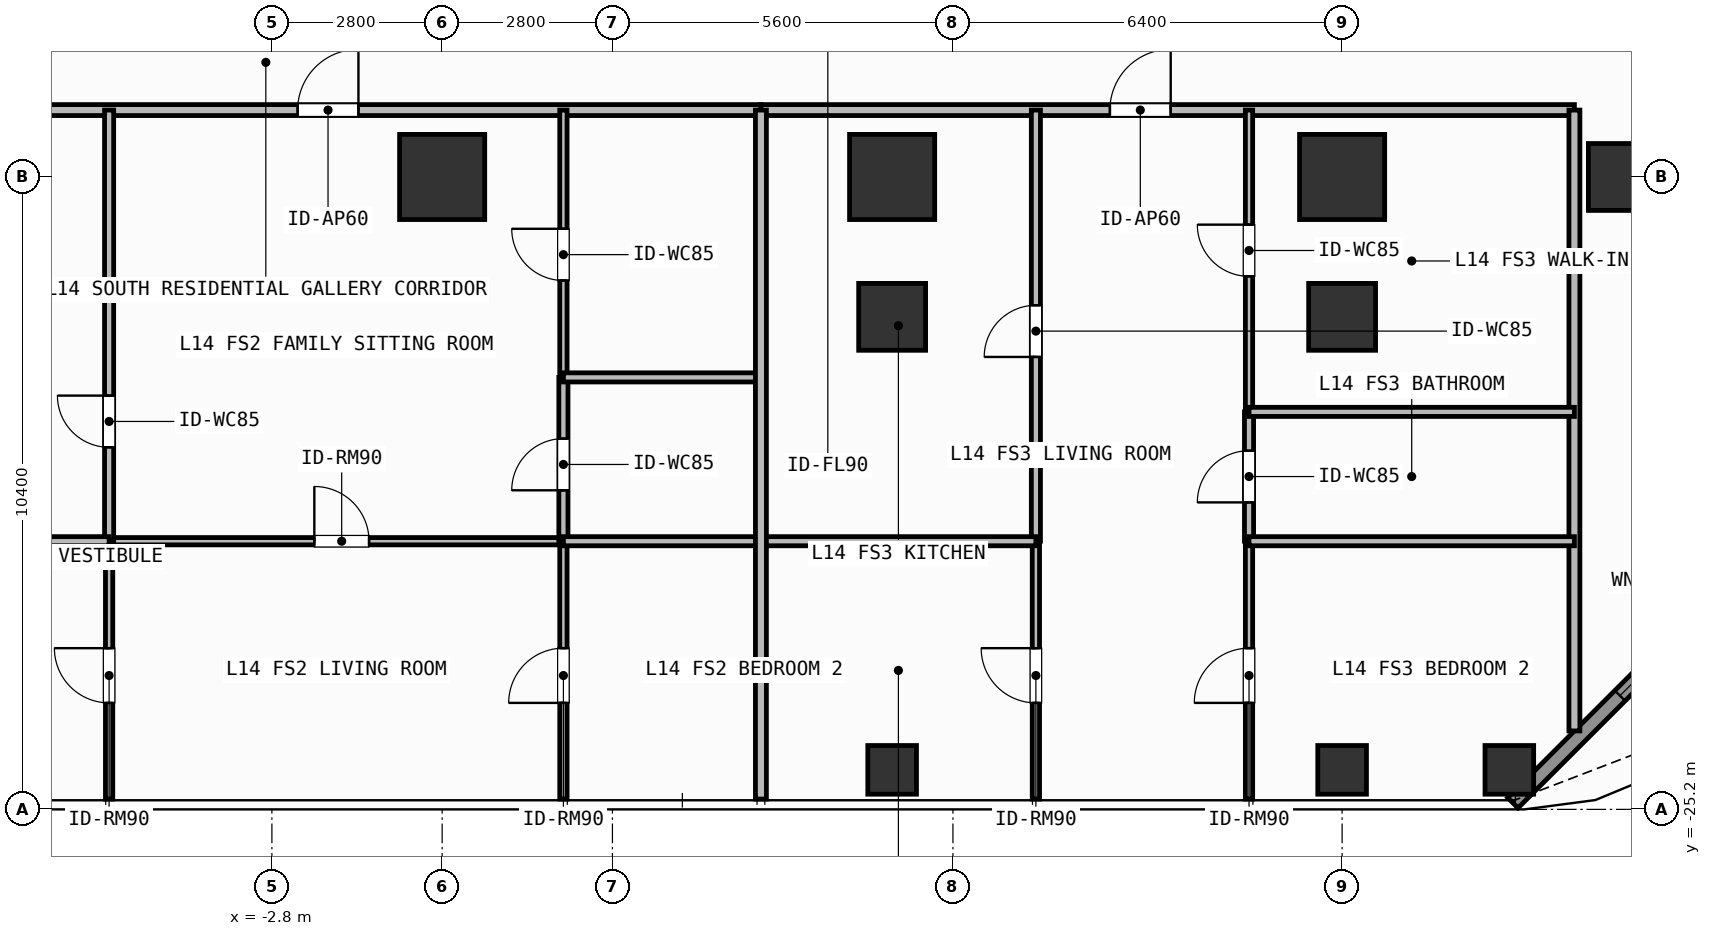
"""IFC4 building model, lengths in metres.
Left out: names, types, materials, properties, quantities, classifications, styles, units other than length and angle.
Written with IfcOpenShell. Run it as: python <this file> out.ifc"""

import sys

from ifc_helpers import new_model, si_unit, direction, frame, frame_2d, origin, origin_2d, place, context, subcontext, project, spatial, rectangle, hollow_rectangle, extrude, element, fill, save


model = new_model("IFC4")
c1 = context("Model", 3, precision=1e-05, world=origin(), true_north=direction((0.0, 1.0)))
c2 = subcontext(c1, "Body", "Model", "MODEL_VIEW")
j1 = project(units=[si_unit("LENGTHUNIT", "METRE"), si_unit("PLANEANGLEUNIT", "RADIAN")], contexts=[c1])
p1 = place(None, origin())
s1 = spatial("IfcSite", under=j1, at=p1, CompositionType="ELEMENT")
p2 = place(p1, origin())
s2 = spatial("IfcBuilding", under=s1, at=p2, CompositionType="ELEMENT")
p3 = place(p2, frame((0.0, 0.0, 54.0)))
s3 = spatial("IfcBuildingStorey", under=s2, at=p3, CompositionType="ELEMENT", Elevation=54.0)
for number, where, z_axis, x_axis in (
    (1, (0.0, -14.8, 0.0), (0.0, 0.0, 1.0), (1.0, 0.0, 0.0)),
    (2, (7.4, -14.8, 0.0), (0.0, 0.0, 1.0), (1.0, 0.0, 0.0)),
    (3, (14.8, -14.8, 0.0), (0.0, 0.0, 1.0), (1.0, 0.0, 0.0)),
):
    element("IfcColumn", number, at=place(p3, frame(where, z_axis=z_axis, x_axis=x_axis)), inside=s3, PredefinedType="COLUMN", context=c2, shape_type="SweptSolid", body=[
        extrude(rectangle(XDim=1.4, YDim=1.4, at=origin_2d()), origin(), (0.0, 0.0, 1.0), 3.9),
    ])
for number, where, z_axis, x_axis in (
    (4, (19.4, -14.8, 0.0), (0.0, 0.0, 1.0), (1.0, 0.0, 0.0)),
    (5, (7.4, -17.1, 0.0), (0.0, 0.0, 1.0), (1.0, 0.0, 0.0)),
    (6, (14.8, -17.1, 0.0), (0.0, 0.0, 1.0), (1.0, 0.0, 0.0)),
):
    element("IfcColumn", number, at=place(p3, frame(where, z_axis=z_axis, x_axis=x_axis)), inside=s3, PredefinedType="COLUMN", context=c2, shape_type="SweptSolid", body=[
        extrude(rectangle(XDim=1.1, YDim=1.1, at=origin_2d()), origin(), (0.0, 0.0, 1.0), 3.9),
    ])
for number, where, z_axis, x_axis in (
    (7, (17.55, -24.55, 0.0), (0.0, 0.0, 1.0), (1.0, 0.0, 0.0)),
    (8, (7.4, -24.55, 0.0), (0.0, 0.0, 1.0), (1.0, 0.0, 0.0)),
    (9, (14.8, -24.55, 0.0), (0.0, 0.0, 1.0), (1.0, 0.0, 0.0)),
):
    element("IfcColumn", number, at=place(p3, frame(where, z_axis=z_axis, x_axis=x_axis)), inside=s3, PredefinedType="COLUMN", context=c2, shape_type="SweptSolid", body=[
        extrude(hollow_rectangle(XDim=0.8, YDim=0.8, WallThickness=0.036, at=origin_2d()), origin(), (0.0, 0.0, 1.0), 3.9),
    ])
p4 = place(p3, frame((22.192, -20.508, 0.0), z_axis=(0.0, 0.0, 1.0), x_axis=(-0.707106781187, -0.707106781187, 0.0)))
e10 = element("IfcWall", 10, at=p4, inside=s3, PredefinedType="SOLIDWALL", context=c2, shape_type="SweptSolid", body=[
    extrude(rectangle(XDim=6.484, YDim=0.24, at=frame_2d((3.242, 0.0))), origin(), (0.0, 0.0, 1.0), 3.68),
])
p5 = place(p4, frame((2.492, 0.0, 0.8)))
e11 = element("IfcOpeningElement", 11, at=p5, cuts=e10, PredefinedType="OPENING", context=c2, shape_type="SweptSolid", body=[
    extrude(rectangle(XDim=1.5, YDim=1.85, at=frame_2d((0.75, 0.925))), frame((0.0, 0.13, 0.0), z_axis=(0.0, -1.0, 0.0), x_axis=(1.0, 0.0, 0.0)), (0.0, 0.0, 1.0), 0.26),
])
p6 = place(p3, frame((-12.225, -13.7, 0.0), z_axis=(0.0, 0.0, 1.0), x_axis=(1.0, 0.0, 0.0)))
e12 = element("IfcWall", 12, at=p6, inside=s3, PredefinedType="PARTITIONING", context=c2, shape_type="SweptSolid", body=[
    extrude(rectangle(XDim=17.467, YDim=0.18, at=frame_2d((8.733, 0.0))), origin(), (0.0, 0.0, 1.0), 3.68),
])
p7 = place(p6, frame((9.848, 0.0, 0.0)))
e13 = element("IfcOpeningElement", 13, at=p7, cuts=e12, PredefinedType="OPENING", context=c2, shape_type="SweptSolid", body=[
    extrude(rectangle(XDim=1.0, YDim=2.2, at=frame_2d((0.5, 1.1))), frame((0.0, 0.1, 0.0), z_axis=(0.0, -1.0, 0.0), x_axis=(1.0, 0.0, 0.0)), (0.0, 0.0, 1.0), 0.2),
])
p8 = place(p3, frame((-5.477, -20.79, 0.0), z_axis=(0.0, 0.0, 1.0), x_axis=(1.0, 0.0, 0.0)))
e14 = element("IfcWall", 14, at=p8, inside=s3, PredefinedType="PARTITIONING", context=c2, shape_type="SweptSolid", body=[
    extrude(rectangle(XDim=7.471, YDim=0.12, at=frame_2d((3.735, 0.0))), origin(), (0.0, 0.0, 1.0), 3.68),
])
p9 = place(p8, frame((3.375, 0.0, 0.0)))
e15 = element("IfcOpeningElement", 15, at=p9, cuts=e14, PredefinedType="OPENING", context=c2, shape_type="SweptSolid", body=[
    extrude(rectangle(XDim=0.9, YDim=2.1, at=frame_2d((0.45, 1.05))), frame((0.0, 0.07, 0.0), z_axis=(0.0, -1.0, 0.0), x_axis=(1.0, 0.0, 0.0)), (0.0, 0.0, 1.0), 0.14),
])
p10 = place(p3, frame((-5.477, -20.79, 0.0), z_axis=(0.0, 0.0, 1.0), x_axis=(0.0, 1.0, 0.0)))
e16 = element("IfcWall", 16, at=p10, inside=s3, PredefinedType="PARTITIONING", context=c2, shape_type="SweptSolid", body=[
    extrude(rectangle(XDim=4.112, YDim=0.15, at=frame_2d((2.056, 0.0))), origin(), (0.0, 0.0, 1.0), 3.68),
])
p11 = place(p10, frame((1.544, 0.0, 0.0)))
e17 = element("IfcOpeningElement", 17, at=p11, cuts=e16, PredefinedType="OPENING", context=c2, shape_type="SweptSolid", body=[
    extrude(rectangle(XDim=0.85, YDim=2.1, at=frame_2d((0.425, 1.05))), frame((0.0, 0.085, 0.0), z_axis=(0.0, -1.0, 0.0), x_axis=(1.0, 0.0, 0.0)), (0.0, 0.0, 1.0), 0.17),
])
p12 = place(p3, frame((-5.477, -16.678, 0.0), z_axis=(0.0, 0.0, 1.0), x_axis=(0.0, 1.0, 0.0)))
e18 = element("IfcWall", 18, at=p12, inside=s3, PredefinedType="PARTITIONING", context=c2, shape_type="SweptSolid", body=[
    extrude(rectangle(XDim=2.978, YDim=0.15, at=frame_2d((1.489, 0.0))), origin(), (0.0, 0.0, 1.0), 3.68),
])
p13 = place(p3, frame((-5.477, -25.03, 0.0), z_axis=(0.0, 0.0, 1.0), x_axis=(0.0, 1.0, 0.0)))
e19 = element("IfcWall", 19, at=p13, inside=s3, PredefinedType="PARTITIONING", context=c2, shape_type="SweptSolid", body=[
    extrude(rectangle(XDim=4.24, YDim=0.12, at=frame_2d((2.12, 0.0))), origin(), (0.0, 0.0, 1.0), 3.68),
])
p14 = place(p13, frame((1.581, 0.0, 0.0)))
e20 = element("IfcOpeningElement", 20, at=p14, cuts=e19, PredefinedType="OPENING", context=c2, shape_type="SweptSolid", body=[
    extrude(rectangle(XDim=0.9, YDim=2.1, at=frame_2d((0.45, 1.05))), frame((0.0, 0.07, 0.0), z_axis=(0.0, -1.0, 0.0), x_axis=(1.0, 0.0, 0.0)), (0.0, 0.0, 1.0), 0.14),
])
p15 = place(p3, frame((1.994, -20.79, 0.0), z_axis=(0.0, 0.0, 1.0), x_axis=(0.0, 1.0, 0.0)))
e21 = element("IfcWall", 21, at=p15, inside=s3, PredefinedType="PARTITIONING", context=c2, shape_type="SweptSolid", body=[
    extrude(rectangle(XDim=2.694, YDim=0.15, at=frame_2d((1.347, 0.0))), origin(), (0.0, 0.0, 1.0), 3.68),
])
p16 = place(p15, frame((0.837, 0.0, 0.0)))
e22 = element("IfcOpeningElement", 22, at=p16, cuts=e21, PredefinedType="OPENING", context=c2, shape_type="SweptSolid", body=[
    extrude(rectangle(XDim=0.85, YDim=2.1, at=frame_2d((0.425, 1.05))), frame((0.0, 0.085, 0.0), z_axis=(0.0, -1.0, 0.0), x_axis=(1.0, 0.0, 0.0)), (0.0, 0.0, 1.0), 0.17),
])
p17 = place(p3, frame((1.994, -18.096, 0.0), z_axis=(0.0, 0.0, 1.0), x_axis=(0.0, 1.0, 0.0)))
e23 = element("IfcWall", 23, at=p17, inside=s3, PredefinedType="PARTITIONING", context=c2, shape_type="SweptSolid", body=[
    extrude(rectangle(XDim=4.396, YDim=0.12, at=frame_2d((2.198, 0.0))), origin(), (0.0, 0.0, 1.0), 3.68),
])
p18 = place(p17, frame((1.594, 0.0, 0.0)))
e24 = element("IfcOpeningElement", 24, at=p18, cuts=e23, PredefinedType="OPENING", context=c2, shape_type="SweptSolid", body=[
    extrude(rectangle(XDim=0.85, YDim=2.1, at=frame_2d((0.425, 1.05))), frame((0.0, 0.07, 0.0), z_axis=(0.0, -1.0, 0.0), x_axis=(1.0, 0.0, 0.0)), (0.0, 0.0, 1.0), 0.14),
])
p19 = place(p3, frame((1.994, -25.03, 0.0), z_axis=(0.0, 0.0, 1.0), x_axis=(0.0, 1.0, 0.0)))
e25 = element("IfcWall", 25, at=p19, inside=s3, PredefinedType="PARTITIONING", context=c2, shape_type="SweptSolid", body=[
    extrude(rectangle(XDim=4.24, YDim=0.12, at=frame_2d((2.12, 0.0))), origin(), (0.0, 0.0, 1.0), 3.68),
])
p20 = place(p19, frame((1.581, 0.0, 0.0)))
e26 = element("IfcOpeningElement", 26, at=p20, cuts=e25, PredefinedType="OPENING", context=c2, shape_type="SweptSolid", body=[
    extrude(rectangle(XDim=0.9, YDim=2.1, at=frame_2d((0.45, 1.05))), frame((0.0, 0.07, 0.0), z_axis=(0.0, -1.0, 0.0), x_axis=(1.0, 0.0, 0.0)), (0.0, 0.0, 1.0), 0.14),
])
p21 = place(p3, frame((5.242, -13.7, 0.0), z_axis=(0.0, 0.0, 1.0), x_axis=(1.0, 0.0, 0.0)))
e27 = element("IfcWall", 27, at=p21, inside=s3, PredefinedType="PARTITIONING", context=c2, shape_type="SweptSolid", body=[
    extrude(rectangle(XDim=13.378, YDim=0.18, at=frame_2d((6.689, 0.0))), origin(), (0.0, 0.0, 1.0), 3.68),
])
p22 = place(p21, frame((5.739, 0.0, 0.0)))
e28 = element("IfcOpeningElement", 28, at=p22, cuts=e27, PredefinedType="OPENING", context=c2, shape_type="SweptSolid", body=[
    extrude(rectangle(XDim=1.0, YDim=2.2, at=frame_2d((0.5, 1.1))), frame((0.0, 0.1, 0.0), z_axis=(0.0, -1.0, 0.0), x_axis=(1.0, 0.0, 0.0)), (0.0, 0.0, 1.0), 0.2),
])
p23 = place(p3, frame((9.764, -20.79, 0.0), z_axis=(0.0, 0.0, 1.0), x_axis=(0.0, 1.0, 0.0)))
e29 = element("IfcWall", 29, at=p23, inside=s3, PredefinedType="PARTITIONING", context=c2, shape_type="SweptSolid", body=[
    extrude(rectangle(XDim=7.09, YDim=0.15, at=frame_2d((3.545, 0.0))), origin(), (0.0, 0.0, 1.0), 3.68),
])
p24 = place(p23, frame((3.03, 0.0, 0.0)))
e30 = element("IfcOpeningElement", 30, at=p24, cuts=e29, PredefinedType="OPENING", context=c2, shape_type="SweptSolid", body=[
    extrude(rectangle(XDim=0.85, YDim=2.1, at=frame_2d((0.425, 1.05))), frame((0.0, 0.085, 0.0), z_axis=(0.0, -1.0, 0.0), x_axis=(1.0, 0.0, 0.0)), (0.0, 0.0, 1.0), 0.17),
])
p25 = place(p3, frame((9.764, -25.03, 0.0), z_axis=(0.0, 0.0, 1.0), x_axis=(0.0, 1.0, 0.0)))
e31 = element("IfcWall", 31, at=p25, inside=s3, PredefinedType="PARTITIONING", context=c2, shape_type="SweptSolid", body=[
    extrude(rectangle(XDim=4.24, YDim=0.12, at=frame_2d((2.12, 0.0))), origin(), (0.0, 0.0, 1.0), 3.68),
])
p26 = place(p25, frame((1.581, 0.0, 0.0)))
e32 = element("IfcOpeningElement", 32, at=p26, cuts=e31, PredefinedType="OPENING", context=c2, shape_type="SweptSolid", body=[
    extrude(rectangle(XDim=0.9, YDim=2.1, at=frame_2d((0.45, 1.05))), frame((0.0, 0.07, 0.0), z_axis=(0.0, -1.0, 0.0), x_axis=(1.0, 0.0, 0.0)), (0.0, 0.0, 1.0), 0.14),
])
p27 = place(p3, frame((13.269, -20.79, 0.0), z_axis=(0.0, 0.0, 1.0), x_axis=(0.0, 1.0, 0.0)))
e33 = element("IfcWall", 33, at=p27, inside=s3, PredefinedType="PARTITIONING", context=c2, shape_type="SweptSolid", body=[
    extrude(rectangle(XDim=2.127, YDim=0.15, at=frame_2d((1.063, 0.0))), origin(), (0.0, 0.0, 1.0), 3.68),
])
p28 = place(p27, frame((0.638, 0.0, 0.0)))
e34 = element("IfcOpeningElement", 34, at=p28, cuts=e33, PredefinedType="OPENING", context=c2, shape_type="SweptSolid", body=[
    extrude(rectangle(XDim=0.85, YDim=2.1, at=frame_2d((0.425, 1.05))), frame((0.0, 0.085, 0.0), z_axis=(0.0, -1.0, 0.0), x_axis=(1.0, 0.0, 0.0)), (0.0, 0.0, 1.0), 0.17),
])
p29 = place(p3, frame((13.269, -18.663, 0.0), z_axis=(0.0, 0.0, 1.0), x_axis=(0.0, 1.0, 0.0)))
e35 = element("IfcWall", 35, at=p29, inside=s3, PredefinedType="PARTITIONING", context=c2, shape_type="SweptSolid", body=[
    extrude(rectangle(XDim=4.963, YDim=0.12, at=frame_2d((2.481, 0.0))), origin(), (0.0, 0.0, 1.0), 3.68),
])
p30 = place(p29, frame((2.229, 0.0, 0.0)))
e36 = element("IfcOpeningElement", 36, at=p30, cuts=e35, PredefinedType="OPENING", context=c2, shape_type="SweptSolid", body=[
    extrude(rectangle(XDim=0.85, YDim=2.1, at=frame_2d((0.425, 1.05))), frame((0.0, 0.07, 0.0), z_axis=(0.0, -1.0, 0.0), x_axis=(1.0, 0.0, 0.0)), (0.0, 0.0, 1.0), 0.14),
])
p31 = place(p3, frame((13.269, -25.03, 0.0), z_axis=(0.0, 0.0, 1.0), x_axis=(0.0, 1.0, 0.0)))
e37 = element("IfcWall", 37, at=p31, inside=s3, PredefinedType="PARTITIONING", context=c2, shape_type="SweptSolid", body=[
    extrude(rectangle(XDim=4.24, YDim=0.12, at=frame_2d((2.12, 0.0))), origin(), (0.0, 0.0, 1.0), 3.68),
])
p32 = place(p31, frame((1.581, 0.0, 0.0)))
e38 = element("IfcOpeningElement", 38, at=p32, cuts=e37, PredefinedType="OPENING", context=c2, shape_type="SweptSolid", body=[
    extrude(rectangle(XDim=0.9, YDim=2.1, at=frame_2d((0.45, 1.05))), frame((0.0, 0.07, 0.0), z_axis=(0.0, -1.0, 0.0), x_axis=(1.0, 0.0, 0.0)), (0.0, 0.0, 1.0), 0.14),
])
p33 = place(p3, frame((18.62, -23.91, 0.0), z_axis=(0.0, 0.0, 1.0), x_axis=(0.0, 1.0, 0.0)))
e39 = element("IfcWall", 39, at=p33, inside=s3, PredefinedType="PARTITIONING", context=c2, shape_type="SweptSolid", body=[
    extrude(rectangle(XDim=10.21, YDim=0.18, at=frame_2d((5.105, 0.0))), origin(), (0.0, 0.0, 1.0), 3.68),
])
p34 = place(p3, frame((-12.225, -16.678, 0.0), z_axis=(0.0, 0.0, 1.0), x_axis=(1.0, 0.0, 0.0)))
e40 = element("IfcWall", 40, at=p34, inside=s3, PredefinedType="PARTITIONING", context=c2, shape_type="SweptSolid", body=[
    extrude(rectangle(XDim=6.748, YDim=0.15, at=frame_2d((3.374, 0.0))), origin(), (0.0, 0.0, 1.0), 3.68),
])
p35 = place(p34, frame((2.859, 0.0, 0.0)))
e41 = element("IfcOpeningElement", 41, at=p35, cuts=e40, PredefinedType="OPENING", context=c2, shape_type="SweptSolid", body=[
    extrude(rectangle(XDim=0.85, YDim=2.1, at=frame_2d((0.425, 1.05))), frame((0.0, 0.085, 0.0), z_axis=(0.0, -1.0, 0.0), x_axis=(1.0, 0.0, 0.0)), (0.0, 0.0, 1.0), 0.17),
])
p36 = place(p3, frame((-12.225, -20.79, 0.0), z_axis=(0.0, 0.0, 1.0), x_axis=(1.0, 0.0, 0.0)))
e42 = element("IfcWall", 42, at=p36, inside=s3, PredefinedType="PARTITIONING", context=c2, shape_type="SweptSolid", body=[
    extrude(rectangle(XDim=6.748, YDim=0.15, at=frame_2d((3.374, 0.0))), origin(), (0.0, 0.0, 1.0), 3.68),
])
for number, where, z_axis, x_axis in (
    (43, (1.994, -18.096, 0.0), (0.0, 0.0, 1.0), (1.0, 0.0, 0.0)),
    (44, (1.994, -20.79, 0.0), (0.0, 0.0, 1.0), (1.0, 0.0, 0.0)),
):
    element("IfcWall", number, at=place(p3, frame(where, z_axis=z_axis, x_axis=x_axis)), inside=s3, PredefinedType="PARTITIONING", context=c2, shape_type="SweptSolid", body=[
        extrude(rectangle(XDim=3.248, YDim=0.15, at=frame_2d((1.624, 0.0))), origin(), (0.0, 0.0, 1.0), 3.68),
    ])
p37 = place(p3, frame((5.242, -20.79, 0.0), z_axis=(0.0, 0.0, 1.0), x_axis=(1.0, 0.0, 0.0)))
e45 = element("IfcWall", 45, at=p37, inside=s3, PredefinedType="PARTITIONING", context=c2, shape_type="SweptSolid", body=[
    extrude(rectangle(XDim=4.522, YDim=0.15, at=frame_2d((2.261, 0.0))), origin(), (0.0, 0.0, 1.0), 3.68),
])
for number, where, z_axis, x_axis in (
    (46, (13.269, -18.663, 0.0), (0.0, 0.0, 1.0), (1.0, 0.0, 0.0)),
    (47, (13.269, -20.79, 0.0), (0.0, 0.0, 1.0), (1.0, 0.0, 0.0)),
):
    element("IfcWall", number, at=place(p3, frame(where, z_axis=z_axis, x_axis=x_axis)), inside=s3, PredefinedType="PARTITIONING", context=c2, shape_type="SweptSolid", body=[
        extrude(rectangle(XDim=5.351, YDim=0.15, at=frame_2d((2.676, 0.0))), origin(), (0.0, 0.0, 1.0), 3.68),
    ])
p38 = place(p3, frame((5.242, -25.03, 0.0), z_axis=(0.0, 0.0, 1.0), x_axis=(0.0, 1.0, 0.0)))
e48 = element("IfcWall", 48, at=p38, inside=s3, PredefinedType="PARTITIONING", context=c2, shape_type="SweptSolid", body=[
    extrude(rectangle(XDim=11.33, YDim=0.18, at=frame_2d((5.665, 0.0))), origin(), (0.0, 0.0, 1.0), 3.68),
])
p39 = place(p5, origin())
e49 = element("IfcWindow", 49, at=p39, inside=s3, PartitioningType="SINGLE_PANEL", PredefinedType="WINDOW", context=c2, shape_type="SweptSolid", body=[
    extrude(rectangle(XDim=1.5, YDim=1.85, at=frame_2d((0.75, 0.925))), frame((0.0, 0.03, 0.0), z_axis=(0.0, -1.0, 0.0), x_axis=(1.0, 0.0, 0.0)), (0.0, 0.0, 1.0), 0.06),
])
fill(e11, e49)
p40 = place(p7, origin())
e50 = element("IfcDoor", 50, at=p40, inside=s3, OperationType="SINGLE_SWING_RIGHT", PredefinedType="DOOR", context=c2, shape_type="SweptSolid", body=[
    extrude(rectangle(XDim=1.0, YDim=2.2, at=frame_2d((0.5, 1.1))), frame((0.0, 0.025, 0.0), z_axis=(0.0, -1.0, 0.0), x_axis=(1.0, 0.0, 0.0)), (0.0, 0.0, 1.0), 0.05),
])
fill(e13, e50)
p41 = place(p9, origin())
e51 = element("IfcDoor", 51, at=p41, inside=s3, OperationType="SINGLE_SWING_LEFT", PredefinedType="DOOR", context=c2, shape_type="SweptSolid", body=[
    extrude(rectangle(XDim=0.9, YDim=2.1, at=frame_2d((0.45, 1.05))), frame((0.0, 0.025, 0.0), z_axis=(0.0, -1.0, 0.0), x_axis=(1.0, 0.0, 0.0)), (0.0, 0.0, 1.0), 0.05),
])
fill(e15, e51)
p42 = place(p11, origin())
e52 = element("IfcDoor", 52, at=p42, inside=s3, OperationType="SINGLE_SWING_RIGHT", PredefinedType="DOOR", context=c2, shape_type="SweptSolid", body=[
    extrude(rectangle(XDim=0.85, YDim=2.1, at=frame_2d((0.425, 1.05))), frame((0.0, 0.025, 0.0), z_axis=(0.0, -1.0, 0.0), x_axis=(1.0, 0.0, 0.0)), (0.0, 0.0, 1.0), 0.05),
])
fill(e17, e52)
p43 = place(p14, origin())
e53 = element("IfcDoor", 53, at=p43, inside=s3, OperationType="SINGLE_SWING_RIGHT", PredefinedType="DOOR", context=c2, shape_type="SweptSolid", body=[
    extrude(rectangle(XDim=0.9, YDim=2.1, at=frame_2d((0.45, 1.05))), frame((0.0, 0.025, 0.0), z_axis=(0.0, -1.0, 0.0), x_axis=(1.0, 0.0, 0.0)), (0.0, 0.0, 1.0), 0.05),
])
fill(e20, e53)
p44 = place(p16, origin())
e54 = element("IfcDoor", 54, at=p44, inside=s3, OperationType="SINGLE_SWING_LEFT", PredefinedType="DOOR", context=c2, shape_type="SweptSolid", body=[
    extrude(rectangle(XDim=0.85, YDim=2.1, at=frame_2d((0.425, 1.05))), frame((0.0, 0.025, 0.0), z_axis=(0.0, -1.0, 0.0), x_axis=(1.0, 0.0, 0.0)), (0.0, 0.0, 1.0), 0.05),
])
fill(e22, e54)
p45 = place(p18, origin())
e55 = element("IfcDoor", 55, at=p45, inside=s3, OperationType="SINGLE_SWING_RIGHT", PredefinedType="DOOR", context=c2, shape_type="SweptSolid", body=[
    extrude(rectangle(XDim=0.85, YDim=2.1, at=frame_2d((0.425, 1.05))), frame((0.0, 0.025, 0.0), z_axis=(0.0, -1.0, 0.0), x_axis=(1.0, 0.0, 0.0)), (0.0, 0.0, 1.0), 0.05),
])
fill(e24, e55)
p46 = place(p20, origin())
e56 = element("IfcDoor", 56, at=p46, inside=s3, OperationType="SINGLE_SWING_LEFT", PredefinedType="DOOR", context=c2, shape_type="SweptSolid", body=[
    extrude(rectangle(XDim=0.9, YDim=2.1, at=frame_2d((0.45, 1.05))), frame((0.0, 0.025, 0.0), z_axis=(0.0, -1.0, 0.0), x_axis=(1.0, 0.0, 0.0)), (0.0, 0.0, 1.0), 0.05),
])
fill(e26, e56)
p47 = place(p22, origin())
e57 = element("IfcDoor", 57, at=p47, inside=s3, OperationType="SINGLE_SWING_RIGHT", PredefinedType="DOOR", context=c2, shape_type="SweptSolid", body=[
    extrude(rectangle(XDim=1.0, YDim=2.2, at=frame_2d((0.5, 1.1))), frame((0.0, 0.025, 0.0), z_axis=(0.0, -1.0, 0.0), x_axis=(1.0, 0.0, 0.0)), (0.0, 0.0, 1.0), 0.05),
])
fill(e28, e57)
p48 = place(p24, origin())
e58 = element("IfcDoor", 58, at=p48, inside=s3, OperationType="SINGLE_SWING_LEFT", PredefinedType="DOOR", context=c2, shape_type="SweptSolid", body=[
    extrude(rectangle(XDim=0.85, YDim=2.1, at=frame_2d((0.425, 1.05))), frame((0.0, 0.025, 0.0), z_axis=(0.0, -1.0, 0.0), x_axis=(1.0, 0.0, 0.0)), (0.0, 0.0, 1.0), 0.05),
])
fill(e30, e58)
p49 = place(p26, origin())
e59 = element("IfcDoor", 59, at=p49, inside=s3, OperationType="SINGLE_SWING_RIGHT", PredefinedType="DOOR", context=c2, shape_type="SweptSolid", body=[
    extrude(rectangle(XDim=0.9, YDim=2.1, at=frame_2d((0.45, 1.05))), frame((0.0, 0.025, 0.0), z_axis=(0.0, -1.0, 0.0), x_axis=(1.0, 0.0, 0.0)), (0.0, 0.0, 1.0), 0.05),
])
fill(e32, e59)
p50 = place(p28, origin())
e60 = element("IfcDoor", 60, at=p50, inside=s3, OperationType="SINGLE_SWING_LEFT", PredefinedType="DOOR", context=c2, shape_type="SweptSolid", body=[
    extrude(rectangle(XDim=0.85, YDim=2.1, at=frame_2d((0.425, 1.05))), frame((0.0, 0.025, 0.0), z_axis=(0.0, -1.0, 0.0), x_axis=(1.0, 0.0, 0.0)), (0.0, 0.0, 1.0), 0.05),
])
fill(e34, e60)
p51 = place(p30, origin())
e61 = element("IfcDoor", 61, at=p51, inside=s3, OperationType="SINGLE_SWING_RIGHT", PredefinedType="DOOR", context=c2, shape_type="SweptSolid", body=[
    extrude(rectangle(XDim=0.85, YDim=2.1, at=frame_2d((0.425, 1.05))), frame((0.0, 0.025, 0.0), z_axis=(0.0, -1.0, 0.0), x_axis=(1.0, 0.0, 0.0)), (0.0, 0.0, 1.0), 0.05),
])
fill(e36, e61)
p52 = place(p32, origin())
e62 = element("IfcDoor", 62, at=p52, inside=s3, OperationType="SINGLE_SWING_LEFT", PredefinedType="DOOR", context=c2, shape_type="SweptSolid", body=[
    extrude(rectangle(XDim=0.9, YDim=2.1, at=frame_2d((0.45, 1.05))), frame((0.0, 0.025, 0.0), z_axis=(0.0, -1.0, 0.0), x_axis=(1.0, 0.0, 0.0)), (0.0, 0.0, 1.0), 0.05),
])
fill(e38, e62)
save(model, sys.argv[1])
